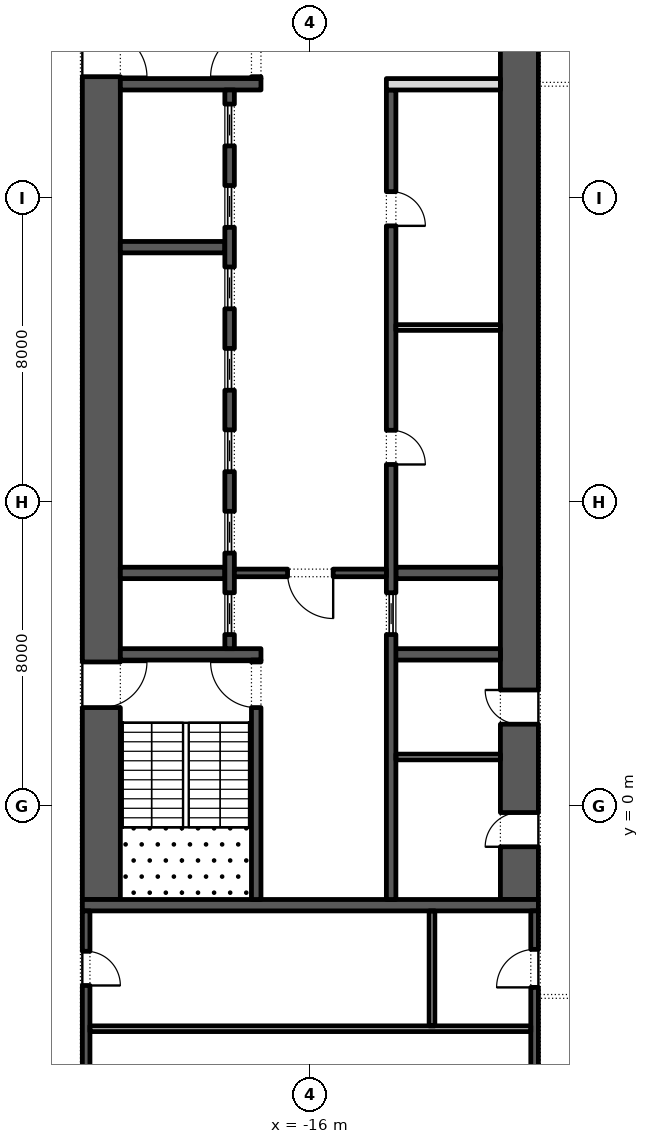
"""IFC4 building model, lengths in metres.
Left out: names, types, materials, properties, quantities, classifications, styles, units other than length and angle.
Written with IfcOpenShell. Run it as: python <this file> out.ifc"""

import sys

from ifc_helpers import new_model, si_unit, direction, frame, frame_2d, origin, place, context, subcontext, project, spatial, rectangle, extrude, element, fill, save


model = new_model("IFC4")
c1 = context("Model", 3, precision=1e-05, world=origin(), true_north=direction((0.0, 1.0)))
c2 = subcontext(c1, "Body", "Model", "MODEL_VIEW")
j1 = project(units=[si_unit("LENGTHUNIT", "METRE"), si_unit("PLANEANGLEUNIT", "RADIAN")], contexts=[c1])
p1 = place(None, origin())
s1 = spatial("IfcSite", under=j1, at=p1, CompositionType="ELEMENT")
p2 = place(p1, origin())
s2 = spatial("IfcBuilding", under=s1, at=p2, CompositionType="ELEMENT")
p3 = place(p2, frame((0.0, 0.0, 52.2)))
s3 = spatial("IfcBuildingStorey", under=s2, at=p3, CompositionType="ELEMENT", Elevation=52.2)
p4 = place(p3, frame((-21.5, -2.45, 0.0), z_axis=(0.0, 0.0, 1.0), x_axis=(0.0, 1.0, 0.0)))
e1 = element("IfcWall", 1, at=p4, inside=s3, PredefinedType="SHEAR", context=c2, shape_type="SweptSolid", body=[
    extrude(rectangle(XDim=27.9, YDim=1.0, at=frame_2d((13.95, 0.0))), origin(), (0.0, 0.0, 1.0), 4.0),
])
p5 = place(p4, frame((5.05, 0.0, 0.0)))
e2 = element("IfcOpeningElement", 2, at=p5, cuts=e1, PredefinedType="OPENING", context=c2, shape_type="SweptSolid", body=[
    extrude(rectangle(XDim=1.2, YDim=2.1, at=frame_2d((0.6, 1.05))), frame((0.0, 0.51, 0.0), z_axis=(0.0, -1.0, 0.0), x_axis=(1.0, 0.0, 0.0)), (0.0, 0.0, 1.0), 1.02),
])
p6 = place(p4, frame((21.65, 0.0, 0.0)))
e3 = element("IfcOpeningElement", 3, at=p6, cuts=e1, PredefinedType="OPENING", context=c2, shape_type="SweptSolid", body=[
    extrude(rectangle(XDim=1.2, YDim=2.1, at=frame_2d((0.6, 1.05))), frame((0.0, 0.51, 0.0), z_axis=(0.0, -1.0, 0.0), x_axis=(1.0, 0.0, 0.0)), (0.0, 0.0, 1.0), 1.02),
])
p7 = place(p3, frame((-10.5, -2.45, 0.0), z_axis=(0.0, 0.0, 1.0), x_axis=(0.0, 1.0, 0.0)))
e4 = element("IfcWall", 4, at=p7, inside=s3, PredefinedType="SHEAR", context=c2, shape_type="SweptSolid", body=[
    extrude(rectangle(XDim=27.9, YDim=1.0, at=frame_2d((13.95, 0.0))), origin(), (0.0, 0.0, 1.0), 4.0),
])
p8 = place(p7, frame((23.65, 0.0, 0.0)))
e5 = element("IfcOpeningElement", 5, at=p8, cuts=e4, PredefinedType="OPENING", context=c2, shape_type="SweptSolid", body=[
    extrude(rectangle(XDim=2.4, YDim=2.1, at=frame_2d((1.2, 1.05))), frame((0.0, 0.51, 0.0), z_axis=(0.0, -1.0, 0.0), x_axis=(1.0, 0.0, 0.0)), (0.0, 0.0, 1.0), 1.02),
])
p9 = place(p7, frame((1.387, 0.0, 0.0)))
e6 = element("IfcOpeningElement", 6, at=p9, cuts=e4, PredefinedType="OPENING", context=c2, shape_type="SweptSolid", body=[
    extrude(rectangle(XDim=0.9, YDim=2.1, at=frame_2d((0.45, 1.05))), frame((0.0, 0.51, 0.0), z_axis=(0.0, -1.0, 0.0), x_axis=(1.0, 0.0, 0.0)), (0.0, 0.0, 1.0), 1.02),
])
p10 = place(p7, frame((4.613, 0.0, 0.0)))
e7 = element("IfcOpeningElement", 7, at=p10, cuts=e4, PredefinedType="OPENING", context=c2, shape_type="SweptSolid", body=[
    extrude(rectangle(XDim=0.9, YDim=2.1, at=frame_2d((0.45, 1.05))), frame((0.0, 0.51, 0.0), z_axis=(0.0, -1.0, 0.0), x_axis=(1.0, 0.0, 0.0)), (0.0, 0.0, 1.0), 1.02),
])
p11 = place(p3, frame((-22.0, -2.6, 0.0), z_axis=(0.0, 0.0, 1.0), x_axis=(1.0, 0.0, 0.0)))
e8 = element("IfcWall", 8, at=p11, inside=s3, PredefinedType="SHEAR", context=c2, shape_type="SweptSolid", body=[
    extrude(rectangle(XDim=12.0, YDim=0.3, at=frame_2d((6.0, 0.0))), origin(), (0.0, 0.0, 1.0), 4.0),
])
p12 = place(p3, frame((-21.0, 4.0, 0.0), z_axis=(0.0, 0.0, 1.0), x_axis=(1.0, 0.0, 0.0)))
e9 = element("IfcWall", 9, at=p12, inside=s3, PredefinedType="SHEAR", context=c2, shape_type="SweptSolid", body=[
    extrude(rectangle(XDim=3.7, YDim=0.3, at=frame_2d((1.85, 0.0))), origin(), (0.0, 0.0, 1.0), 4.0),
])
p13 = place(p3, frame((-17.425, -2.45, 0.0), z_axis=(0.0, 0.0, 1.0), x_axis=(0.0, 1.0, 0.0)))
e10 = element("IfcWall", 10, at=p13, inside=s3, PredefinedType="SHEAR", context=c2, shape_type="SweptSolid", body=[
    extrude(rectangle(XDim=6.3, YDim=0.25, at=frame_2d((3.15, 0.0))), origin(), (0.0, 0.0, 1.0), 4.0),
])
p14 = place(p13, frame((5.05, 0.0, 0.0)))
e11 = element("IfcOpeningElement", 11, at=p14, cuts=e10, PredefinedType="OPENING", context=c2, shape_type="SweptSolid", body=[
    extrude(rectangle(XDim=1.2, YDim=2.1, at=frame_2d((0.6, 1.05))), frame((0.0, 0.135, 0.0), z_axis=(0.0, -1.0, 0.0), x_axis=(1.0, 0.0, 0.0)), (0.0, 0.0, 1.0), 0.27),
])
p15 = place(p3, frame((-21.0, 19.0, 0.0), z_axis=(0.0, 0.0, 1.0), x_axis=(1.0, 0.0, 0.0)))
e12 = element("IfcWall", 12, at=p15, inside=s3, PredefinedType="SHEAR", context=c2, shape_type="SweptSolid", body=[
    extrude(rectangle(XDim=3.7, YDim=0.3, at=frame_2d((1.85, 0.0))), origin(), (0.0, 0.0, 1.0), 4.0),
])
p16 = place(p3, frame((-17.425, 19.15, 0.0), z_axis=(0.0, 0.0, 1.0), x_axis=(0.0, 1.0, 0.0)))
e13 = element("IfcWall", 13, at=p16, inside=s3, PredefinedType="SHEAR", context=c2, shape_type="SweptSolid", body=[
    extrude(rectangle(XDim=6.3, YDim=0.25, at=frame_2d((3.15, 0.0))), origin(), (0.0, 0.0, 1.0), 4.0),
])
p17 = place(p16, frame((0.05, 0.0, 0.0)))
e14 = element("IfcOpeningElement", 14, at=p17, cuts=e13, PredefinedType="OPENING", context=c2, shape_type="SweptSolid", body=[
    extrude(rectangle(XDim=1.2, YDim=2.1, at=frame_2d((0.6, 1.05))), frame((0.0, 0.135, 0.0), z_axis=(0.0, -1.0, 0.0), x_axis=(1.0, 0.0, 0.0)), (0.0, 0.0, 1.0), 0.27),
])
for number, where, z_axis, x_axis in (
    (15, (-21.0, 6.143, 0.0), (0.0, 0.0, 1.0), (1.0, 0.0, 0.0)),
    (16, (-21.0, 14.714, 0.0), (0.0, 0.0, 1.0), (1.0, 0.0, 0.0)),
):
    element("IfcWall", number, at=place(p3, frame(where, z_axis=z_axis, x_axis=x_axis)), inside=s3, PredefinedType="SHEAR", context=c2, shape_type="SweptSolid", body=[
        extrude(rectangle(XDim=2.75, YDim=0.3, at=frame_2d((1.375, 0.0))), origin(), (0.0, 0.0, 1.0), 4.0),
    ])
p18 = place(p3, frame((-18.125, 4.15, 0.0), z_axis=(0.0, 0.0, 1.0), x_axis=(0.0, 1.0, 0.0)))
e17 = element("IfcWall", 17, at=p18, inside=s3, PredefinedType="SHEAR", context=c2, shape_type="SweptSolid", body=[
    extrude(rectangle(XDim=14.7, YDim=0.25, at=frame_2d((7.35, 0.0))), origin(), (0.0, 0.0, 1.0), 4.0),
])
p19 = place(p18, frame((0.371, 0.0, 0.0)))
e18 = element("IfcOpeningElement", 18, at=p19, cuts=e17, PredefinedType="OPENING", context=c2, shape_type="SweptSolid", body=[
    extrude(rectangle(XDim=1.1, YDim=2.1, at=frame_2d((0.55, 1.05))), frame((0.0, 0.135, 0.0), z_axis=(0.0, -1.0, 0.0), x_axis=(1.0, 0.0, 0.0)), (0.0, 0.0, 1.0), 0.27),
])
p20 = place(p18, frame((2.514, 0.0, 0.0)))
e19 = element("IfcOpeningElement", 19, at=p20, cuts=e17, PredefinedType="OPENING", context=c2, shape_type="SweptSolid", body=[
    extrude(rectangle(XDim=1.1, YDim=2.1, at=frame_2d((0.55, 1.05))), frame((0.0, 0.135, 0.0), z_axis=(0.0, -1.0, 0.0), x_axis=(1.0, 0.0, 0.0)), (0.0, 0.0, 1.0), 0.27),
])
p21 = place(p18, frame((4.657, 0.0, 0.0)))
e20 = element("IfcOpeningElement", 20, at=p21, cuts=e17, PredefinedType="OPENING", context=c2, shape_type="SweptSolid", body=[
    extrude(rectangle(XDim=1.1, YDim=2.1, at=frame_2d((0.55, 1.05))), frame((0.0, 0.135, 0.0), z_axis=(0.0, -1.0, 0.0), x_axis=(1.0, 0.0, 0.0)), (0.0, 0.0, 1.0), 0.27),
])
p22 = place(p18, frame((6.8, 0.0, 0.0)))
e21 = element("IfcOpeningElement", 21, at=p22, cuts=e17, PredefinedType="OPENING", context=c2, shape_type="SweptSolid", body=[
    extrude(rectangle(XDim=1.1, YDim=2.1, at=frame_2d((0.55, 1.05))), frame((0.0, 0.135, 0.0), z_axis=(0.0, -1.0, 0.0), x_axis=(1.0, 0.0, 0.0)), (0.0, 0.0, 1.0), 0.27),
])
p23 = place(p18, frame((8.943, 0.0, 0.0)))
e22 = element("IfcOpeningElement", 22, at=p23, cuts=e17, PredefinedType="OPENING", context=c2, shape_type="SweptSolid", body=[
    extrude(rectangle(XDim=1.1, YDim=2.1, at=frame_2d((0.55, 1.05))), frame((0.0, 0.135, 0.0), z_axis=(0.0, -1.0, 0.0), x_axis=(1.0, 0.0, 0.0)), (0.0, 0.0, 1.0), 0.27),
])
p24 = place(p18, frame((11.086, 0.0, 0.0)))
e23 = element("IfcOpeningElement", 23, at=p24, cuts=e17, PredefinedType="OPENING", context=c2, shape_type="SweptSolid", body=[
    extrude(rectangle(XDim=1.1, YDim=2.1, at=frame_2d((0.55, 1.05))), frame((0.0, 0.135, 0.0), z_axis=(0.0, -1.0, 0.0), x_axis=(1.0, 0.0, 0.0)), (0.0, 0.0, 1.0), 0.27),
])
p25 = place(p18, frame((13.229, 0.0, 0.0)))
e24 = element("IfcOpeningElement", 24, at=p25, cuts=e17, PredefinedType="OPENING", context=c2, shape_type="SweptSolid", body=[
    extrude(rectangle(XDim=1.1, YDim=2.1, at=frame_2d((0.55, 1.05))), frame((0.0, 0.135, 0.0), z_axis=(0.0, -1.0, 0.0), x_axis=(1.0, 0.0, 0.0)), (0.0, 0.0, 1.0), 0.27),
])
p26 = place(p3, frame((-14.0, 4.0, 0.0), z_axis=(0.0, 0.0, 1.0), x_axis=(1.0, 0.0, 0.0)))
e25 = element("IfcWall", 25, at=p26, inside=s3, PredefinedType="SHEAR", context=c2, shape_type="SweptSolid", body=[
    extrude(rectangle(XDim=3.0, YDim=0.3, at=frame_2d((1.5, 0.0))), origin(), (0.0, 0.0, 1.0), 4.0),
])
p27 = place(p3, frame((-13.75, 6.143, 0.0), z_axis=(0.0, 0.0, 1.0), x_axis=(1.0, 0.0, 0.0)))
e26 = element("IfcWall", 26, at=p27, inside=s3, PredefinedType="SHEAR", context=c2, shape_type="SweptSolid", body=[
    extrude(rectangle(XDim=2.75, YDim=0.3, at=frame_2d((1.375, 0.0))), origin(), (0.0, 0.0, 1.0), 4.0),
])
p28 = place(p3, frame((-13.875, -2.45, 0.0), z_axis=(0.0, 0.0, 1.0), x_axis=(0.0, 1.0, 0.0)))
e27 = element("IfcWall", 27, at=p28, inside=s3, PredefinedType="SHEAR", context=c2, shape_type="SweptSolid", body=[
    extrude(rectangle(XDim=21.3, YDim=0.25, at=frame_2d((10.65, 0.0))), origin(), (0.0, 0.0, 1.0), 4.0),
])
p29 = place(p28, frame((11.446, 0.0, 0.0)))
e28 = element("IfcOpeningElement", 28, at=p29, cuts=e27, PredefinedType="OPENING", context=c2, shape_type="SweptSolid", body=[
    extrude(rectangle(XDim=0.9, YDim=2.1, at=frame_2d((0.45, 1.05))), frame((0.0, 0.135, 0.0), z_axis=(0.0, -1.0, 0.0), x_axis=(1.0, 0.0, 0.0)), (0.0, 0.0, 1.0), 0.27),
])
p30 = place(p28, frame((17.725, 0.0, 0.0)))
e29 = element("IfcOpeningElement", 29, at=p30, cuts=e27, PredefinedType="OPENING", context=c2, shape_type="SweptSolid", body=[
    extrude(rectangle(XDim=0.9, YDim=2.1, at=frame_2d((0.45, 1.05))), frame((0.0, 0.135, 0.0), z_axis=(0.0, -1.0, 0.0), x_axis=(1.0, 0.0, 0.0)), (0.0, 0.0, 1.0), 0.27),
])
p31 = place(p28, frame((6.971, 0.0, 0.0)))
e30 = element("IfcOpeningElement", 30, at=p31, cuts=e27, PredefinedType="OPENING", context=c2, shape_type="SweptSolid", body=[
    extrude(rectangle(XDim=1.1, YDim=2.1, at=frame_2d((0.55, 1.05))), frame((0.0, 0.135, 0.0), z_axis=(0.0, -1.0, 0.0), x_axis=(1.0, 0.0, 0.0)), (0.0, 0.0, 1.0), 0.27),
])
p32 = place(p3, frame((-14.0, 19.0, 0.0), z_axis=(0.0, 0.0, 1.0), x_axis=(1.0, 0.0, 0.0)))
e31 = element("IfcWall", 31, at=p32, inside=s3, PredefinedType="PARTITIONING", context=c2, shape_type="SweptSolid", body=[
    extrude(rectangle(XDim=3.0, YDim=0.3, at=frame_2d((1.5, 0.0))), origin(), (0.0, 0.0, 1.0), 4.0),
])
p33 = place(p3, frame((-13.75, 12.6, 0.0), z_axis=(0.0, 0.0, 1.0), x_axis=(1.0, 0.0, 0.0)))
e32 = element("IfcWall", 32, at=p33, inside=s3, PredefinedType="PARTITIONING", context=c2, shape_type="SweptSolid", body=[
    extrude(rectangle(XDim=2.75, YDim=0.15, at=frame_2d((1.375, 0.0))), origin(), (0.0, 0.0, 1.0), 4.0),
])
p34 = place(p3, frame((-18.0, 6.143, 0.0), z_axis=(0.0, 0.0, 1.0), x_axis=(1.0, 0.0, 0.0)))
e33 = element("IfcWall", 33, at=p34, inside=s3, PredefinedType="SHEAR", context=c2, shape_type="SweptSolid", body=[
    extrude(rectangle(XDim=4.0, YDim=0.2, at=frame_2d((2.0, 0.0))), origin(), (0.0, 0.0, 1.0), 4.0),
])
p35 = place(p34, frame((1.4, 0.0, 0.0)))
e34 = element("IfcOpeningElement", 34, at=p35, cuts=e33, PredefinedType="OPENING", context=c2, shape_type="SweptSolid", body=[
    extrude(rectangle(XDim=1.2, YDim=2.1, at=frame_2d((0.6, 1.05))), frame((0.0, 0.11, 0.0), z_axis=(0.0, -1.0, 0.0), x_axis=(1.0, 0.0, 0.0)), (0.0, 0.0, 1.0), 0.22),
])
p36 = place(p3, frame((-13.75, 1.3, 0.0), z_axis=(0.0, 0.0, 1.0), x_axis=(1.0, 0.0, 0.0)))
e35 = element("IfcWall", 35, at=p36, inside=s3, PredefinedType="PARTITIONING", context=c2, shape_type="SweptSolid", body=[
    extrude(rectangle(XDim=2.75, YDim=0.15, at=frame_2d((1.375, 0.0))), origin(), (0.0, 0.0, 1.0), 4.0),
])
p37 = place(p3, frame((-21.9, -15.8, 0.0), z_axis=(0.0, 0.0, 1.0), x_axis=(0.0, 1.0, 0.0)))
e36 = element("IfcWall", 36, at=p37, inside=s3, PredefinedType="SHEAR", context=c2, shape_type="SweptSolid", body=[
    extrude(rectangle(XDim=13.05, YDim=0.2, at=frame_2d((6.525, 0.0))), origin(), (0.0, 0.0, 1.0), 4.0),
])
p38 = place(p37, frame((11.087, 0.0, 0.0)))
e37 = element("IfcOpeningElement", 37, at=p38, cuts=e36, PredefinedType="OPENING", context=c2, shape_type="SweptSolid", body=[
    extrude(rectangle(XDim=0.9, YDim=2.1, at=frame_2d((0.45, 1.05))), frame((0.0, 0.11, 0.0), z_axis=(0.0, -1.0, 0.0), x_axis=(1.0, 0.0, 0.0)), (0.0, 0.0, 1.0), 0.22),
])
p39 = place(p3, frame((-10.1, -15.8, 0.0), z_axis=(0.0, 0.0, 1.0), x_axis=(0.0, 1.0, 0.0)))
e38 = element("IfcWall", 38, at=p39, inside=s3, PredefinedType="SHEAR", context=c2, shape_type="SweptSolid", body=[
    extrude(rectangle(XDim=13.05, YDim=0.2, at=frame_2d((6.525, 0.0))), origin(), (0.0, 0.0, 1.0), 4.0),
])
p40 = place(p39, frame((4.488, 0.0, 0.0)))
e39 = element("IfcOpeningElement", 39, at=p40, cuts=e38, PredefinedType="OPENING", context=c2, shape_type="SweptSolid", body=[
    extrude(rectangle(XDim=0.9, YDim=2.1, at=frame_2d((0.45, 1.05))), frame((0.0, 0.11, 0.0), z_axis=(0.0, -1.0, 0.0), x_axis=(1.0, 0.0, 0.0)), (0.0, 0.0, 1.0), 0.22),
])
p41 = place(p39, frame((11.038, 0.0, 0.0)))
e40 = element("IfcOpeningElement", 40, at=p41, cuts=e38, PredefinedType="OPENING", context=c2, shape_type="SweptSolid", body=[
    extrude(rectangle(XDim=1.0, YDim=2.1, at=frame_2d((0.5, 1.05))), frame((0.0, 0.11, 0.0), z_axis=(0.0, -1.0, 0.0), x_axis=(1.0, 0.0, 0.0)), (0.0, 0.0, 1.0), 0.22),
])
p42 = place(p3, frame((-21.8, -5.85, 0.0), z_axis=(0.0, 0.0, 1.0), x_axis=(1.0, 0.0, 0.0)))
e41 = element("IfcWall", 41, at=p42, inside=s3, PredefinedType="PARTITIONING", context=c2, shape_type="SweptSolid", body=[
    extrude(rectangle(XDim=11.6, YDim=0.15, at=frame_2d((5.8, 0.0))), origin(), (0.0, 0.0, 1.0), 4.0),
])
p43 = place(p3, frame((-12.8, -5.775, 0.0), z_axis=(0.0, 0.0, 1.0), x_axis=(0.0, 1.0, 0.0)))
e42 = element("IfcWall", 42, at=p43, inside=s3, PredefinedType="PARTITIONING", context=c2, shape_type="SweptSolid", body=[
    extrude(rectangle(XDim=3.025, YDim=0.15, at=frame_2d((1.512, 0.0))), origin(), (0.0, 0.0, 1.0), 4.0),
])
p44 = place(p19, origin())
e43 = element("IfcDoor", 43, at=p44, inside=s3, OperationType="SLIDING_TO_LEFT", PredefinedType="DOOR", context=c2, shape_type="SweptSolid", body=[
    extrude(rectangle(XDim=1.1, YDim=2.1, at=frame_2d((0.55, 1.05))), frame((0.0, 0.025, 0.0), z_axis=(0.0, -1.0, 0.0), x_axis=(1.0, 0.0, 0.0)), (0.0, 0.0, 1.0), 0.05),
])
fill(e18, e43)
p45 = place(p20, origin())
e44 = element("IfcDoor", 44, at=p45, inside=s3, OperationType="SLIDING_TO_LEFT", PredefinedType="DOOR", context=c2, shape_type="SweptSolid", body=[
    extrude(rectangle(XDim=1.1, YDim=2.1, at=frame_2d((0.55, 1.05))), frame((0.0, 0.025, 0.0), z_axis=(0.0, -1.0, 0.0), x_axis=(1.0, 0.0, 0.0)), (0.0, 0.0, 1.0), 0.05),
])
fill(e19, e44)
p46 = place(p21, origin())
e45 = element("IfcDoor", 45, at=p46, inside=s3, OperationType="SLIDING_TO_LEFT", PredefinedType="DOOR", context=c2, shape_type="SweptSolid", body=[
    extrude(rectangle(XDim=1.1, YDim=2.1, at=frame_2d((0.55, 1.05))), frame((0.0, 0.025, 0.0), z_axis=(0.0, -1.0, 0.0), x_axis=(1.0, 0.0, 0.0)), (0.0, 0.0, 1.0), 0.05),
])
fill(e20, e45)
p47 = place(p22, origin())
e46 = element("IfcDoor", 46, at=p47, inside=s3, OperationType="SLIDING_TO_LEFT", PredefinedType="DOOR", context=c2, shape_type="SweptSolid", body=[
    extrude(rectangle(XDim=1.1, YDim=2.1, at=frame_2d((0.55, 1.05))), frame((0.0, 0.025, 0.0), z_axis=(0.0, -1.0, 0.0), x_axis=(1.0, 0.0, 0.0)), (0.0, 0.0, 1.0), 0.05),
])
fill(e21, e46)
p48 = place(p23, origin())
e47 = element("IfcDoor", 47, at=p48, inside=s3, OperationType="SLIDING_TO_LEFT", PredefinedType="DOOR", context=c2, shape_type="SweptSolid", body=[
    extrude(rectangle(XDim=1.1, YDim=2.1, at=frame_2d((0.55, 1.05))), frame((0.0, 0.025, 0.0), z_axis=(0.0, -1.0, 0.0), x_axis=(1.0, 0.0, 0.0)), (0.0, 0.0, 1.0), 0.05),
])
fill(e22, e47)
p49 = place(p24, origin())
e48 = element("IfcDoor", 48, at=p49, inside=s3, OperationType="SLIDING_TO_LEFT", PredefinedType="DOOR", context=c2, shape_type="SweptSolid", body=[
    extrude(rectangle(XDim=1.1, YDim=2.1, at=frame_2d((0.55, 1.05))), frame((0.0, 0.025, 0.0), z_axis=(0.0, -1.0, 0.0), x_axis=(1.0, 0.0, 0.0)), (0.0, 0.0, 1.0), 0.05),
])
fill(e23, e48)
p50 = place(p25, origin())
e49 = element("IfcDoor", 49, at=p50, inside=s3, OperationType="SLIDING_TO_LEFT", PredefinedType="DOOR", context=c2, shape_type="SweptSolid", body=[
    extrude(rectangle(XDim=1.1, YDim=2.1, at=frame_2d((0.55, 1.05))), frame((0.0, 0.025, 0.0), z_axis=(0.0, -1.0, 0.0), x_axis=(1.0, 0.0, 0.0)), (0.0, 0.0, 1.0), 0.05),
])
fill(e24, e49)
p51 = place(p29, frame((0.9, -0.2, 0.0), z_axis=(0.0, 0.0, 1.0), x_axis=(-1.0, 0.0, 0.0)))
e50 = element("IfcDoor", 50, at=p51, inside=s3, OperationType="SINGLE_SWING_LEFT", PredefinedType="DOOR", context=c2, shape_type="SweptSolid", body=[
    extrude(rectangle(XDim=0.9, YDim=2.1, at=frame_2d((0.45, 1.05))), frame((0.0, -0.075, 0.0), z_axis=(0.0, -1.0, 0.0), x_axis=(1.0, 0.0, 0.0)), (0.0, 0.0, 1.0), 0.05),
])
fill(e28, e50)
p52 = place(p30, frame((0.9, -0.2, 0.0), z_axis=(0.0, 0.0, 1.0), x_axis=(-1.0, 0.0, 0.0)))
e51 = element("IfcDoor", 51, at=p52, inside=s3, OperationType="SINGLE_SWING_LEFT", PredefinedType="DOOR", context=c2, shape_type="SweptSolid", body=[
    extrude(rectangle(XDim=0.9, YDim=2.1, at=frame_2d((0.45, 1.05))), frame((0.0, -0.075, 0.0), z_axis=(0.0, -1.0, 0.0), x_axis=(1.0, 0.0, 0.0)), (0.0, 0.0, 1.0), 0.05),
])
fill(e29, e51)
p53 = place(p31, origin())
e52 = element("IfcDoor", 52, at=p53, inside=s3, OperationType="SLIDING_TO_LEFT", PredefinedType="DOOR", context=c2, shape_type="SweptSolid", body=[
    extrude(rectangle(XDim=1.1, YDim=2.1, at=frame_2d((0.55, 1.05))), frame((0.0, 0.025, 0.0), z_axis=(0.0, -1.0, 0.0), x_axis=(1.0, 0.0, 0.0)), (0.0, 0.0, 1.0), 0.05),
])
fill(e30, e52)
p54 = place(p35, frame((1.2, 0.0, 0.0), z_axis=(0.0, 0.0, 1.0), x_axis=(-1.0, 0.0, 0.0)))
e53 = element("IfcDoor", 53, at=p54, inside=s3, OperationType="SINGLE_SWING_RIGHT", PredefinedType="DOOR", context=c2, shape_type="SweptSolid", body=[
    extrude(rectangle(XDim=1.2, YDim=2.1, at=frame_2d((0.6, 1.05))), frame((0.0, 0.025, 0.0), z_axis=(0.0, -1.0, 0.0), x_axis=(1.0, 0.0, 0.0)), (0.0, 0.0, 1.0), 0.05),
])
fill(e34, e53)
p55 = place(p14, origin())
e54 = element("IfcDoor", 54, at=p55, inside=s3, OperationType="SINGLE_SWING_LEFT", PredefinedType="DOOR", context=c2, shape_type="SweptSolid", body=[
    extrude(rectangle(XDim=1.2, YDim=2.1, at=frame_2d((0.6, 1.05))), frame((0.0, 0.025, 0.0), z_axis=(0.0, -1.0, 0.0), x_axis=(1.0, 0.0, 0.0)), (0.0, 0.0, 1.0), 0.05),
])
fill(e11, e54)
p56 = place(p5, frame((1.2, 0.0, 0.0), z_axis=(0.0, 0.0, 1.0), x_axis=(-1.0, 0.0, 0.0)))
e55 = element("IfcDoor", 55, at=p56, inside=s3, OperationType="SINGLE_SWING_RIGHT", PredefinedType="DOOR", context=c2, shape_type="SweptSolid", body=[
    extrude(rectangle(XDim=1.2, YDim=2.1, at=frame_2d((0.6, 1.05))), frame((0.0, 0.025, 0.0), z_axis=(0.0, -1.0, 0.0), x_axis=(1.0, 0.0, 0.0)), (0.0, 0.0, 1.0), 0.05),
])
fill(e2, e55)
p57 = place(p17, origin())
e56 = element("IfcDoor", 56, at=p57, inside=s3, OperationType="SINGLE_SWING_RIGHT", PredefinedType="DOOR", context=c2, shape_type="SweptSolid", body=[
    extrude(rectangle(XDim=1.2, YDim=2.1, at=frame_2d((0.6, 1.05))), frame((0.0, 0.025, 0.0), z_axis=(0.0, -1.0, 0.0), x_axis=(1.0, 0.0, 0.0)), (0.0, 0.0, 1.0), 0.05),
])
fill(e14, e56)
p58 = place(p6, frame((1.2, 0.0, 0.0), z_axis=(0.0, 0.0, 1.0), x_axis=(-1.0, 0.0, 0.0)))
e57 = element("IfcDoor", 57, at=p58, inside=s3, OperationType="SINGLE_SWING_LEFT", PredefinedType="DOOR", context=c2, shape_type="SweptSolid", body=[
    extrude(rectangle(XDim=1.2, YDim=2.1, at=frame_2d((0.6, 1.05))), frame((0.0, 0.025, 0.0), z_axis=(0.0, -1.0, 0.0), x_axis=(1.0, 0.0, 0.0)), (0.0, 0.0, 1.0), 0.05),
])
fill(e3, e57)
p59 = place(p9, origin())
e58 = element("IfcDoor", 58, at=p59, inside=s3, OperationType="SINGLE_SWING_RIGHT", PredefinedType="DOOR", context=c2, shape_type="SweptSolid", body=[
    extrude(rectangle(XDim=0.9, YDim=2.1, at=frame_2d((0.45, 1.05))), frame((0.0, 0.5, 0.0), z_axis=(0.0, -1.0, 0.0), x_axis=(1.0, 0.0, 0.0)), (0.0, 0.0, 1.0), 0.05),
])
fill(e6, e58)
p60 = place(p10, origin())
e59 = element("IfcDoor", 59, at=p60, inside=s3, OperationType="SINGLE_SWING_LEFT", PredefinedType="DOOR", context=c2, shape_type="SweptSolid", body=[
    extrude(rectangle(XDim=0.9, YDim=2.1, at=frame_2d((0.45, 1.05))), frame((0.0, 0.5, 0.0), z_axis=(0.0, -1.0, 0.0), x_axis=(1.0, 0.0, 0.0)), (0.0, 0.0, 1.0), 0.05),
])
fill(e7, e59)
p61 = place(p41, origin())
e60 = element("IfcDoor", 60, at=p61, inside=s3, OperationType="SINGLE_SWING_RIGHT", PredefinedType="DOOR", context=c2, shape_type="SweptSolid", body=[
    extrude(rectangle(XDim=1.0, YDim=2.1, at=frame_2d((0.5, 1.05))), frame((0.0, 0.1, 0.0), z_axis=(0.0, -1.0, 0.0), x_axis=(1.0, 0.0, 0.0)), (0.0, 0.0, 1.0), 0.05),
])
fill(e40, e60)
p62 = place(p38, frame((0.9, -0.15, 0.0), z_axis=(0.0, 0.0, 1.0), x_axis=(-1.0, 0.0, 0.0)))
e61 = element("IfcDoor", 61, at=p62, inside=s3, OperationType="SINGLE_SWING_LEFT", PredefinedType="DOOR", context=c2, shape_type="SweptSolid", body=[
    extrude(rectangle(XDim=0.9, YDim=2.1, at=frame_2d((0.45, 1.05))), frame((0.0, -0.05, 0.0), z_axis=(0.0, -1.0, 0.0), x_axis=(1.0, 0.0, 0.0)), (0.0, 0.0, 1.0), 0.05),
])
fill(e37, e61)
save(model, sys.argv[1])
